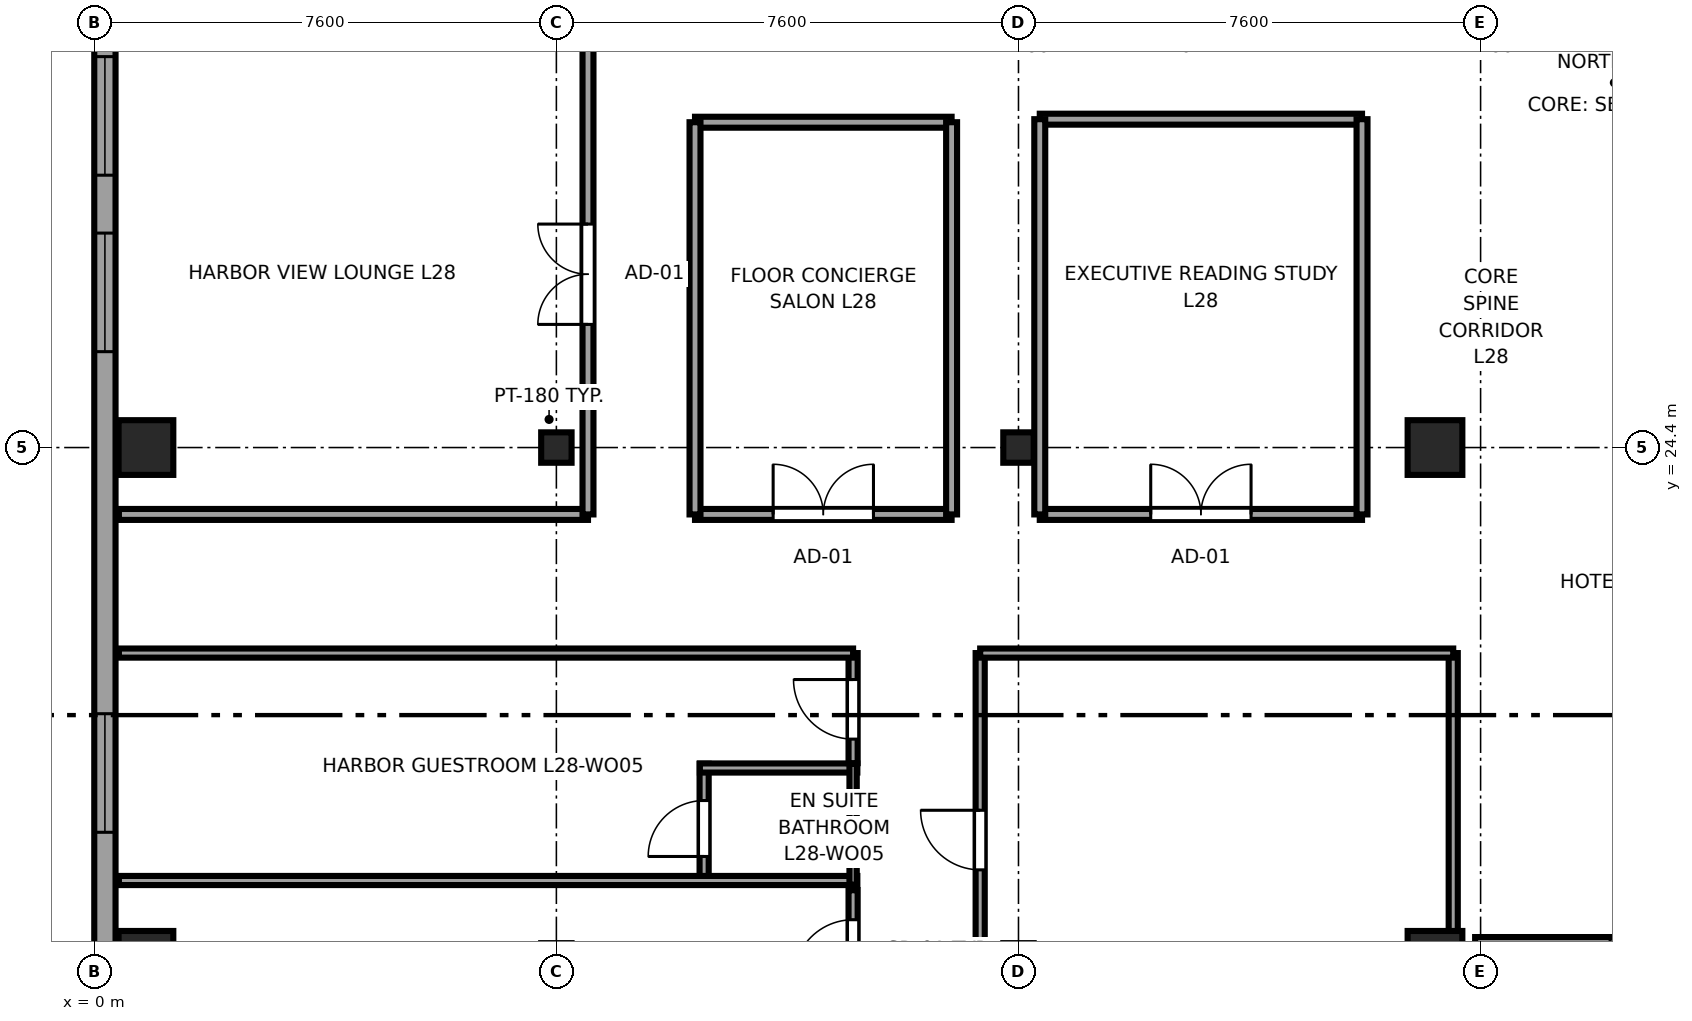
"""IFC4 building model, lengths in metres.
Left out: names, types, materials, properties, quantities, classifications, styles, units other than length and angle.
Written with IfcOpenShell. Run it as: python <this file> out.ifc"""

import sys

from ifc_helpers import new_model, si_unit, direction, frame, frame_2d, origin, origin_2d, place, context, subcontext, project, spatial, rectangle, i_section, extrude, source, transform, mapped, element, fill, save


model = new_model("IFC4")
c1 = context("Model", 3, precision=1e-05, world=origin(), true_north=direction((0.0, 1.0)))
c2 = subcontext(c1, "Body", "Model", "MODEL_VIEW")
j1 = project(units=[si_unit("LENGTHUNIT", "METRE"), si_unit("PLANEANGLEUNIT", "RADIAN")], contexts=[c1])
p1 = place(None, origin())
s1 = spatial("IfcSite", under=j1, at=p1, CompositionType="ELEMENT")
p2 = place(p1, origin())
s2 = spatial("IfcBuilding", under=s1, at=p2, CompositionType="ELEMENT")
p3 = place(p2, frame((0.0, 0.0, 111.55)))
s3 = spatial("IfcBuildingStorey", under=s2, at=p3, CompositionType="ELEMENT", Elevation=111.55)
m1 = source(origin(), c2, "Body", "SweptSolid", [
    extrude(rectangle(XDim=0.9, YDim=0.9, at=origin_2d()), origin(), (0.0, 0.0, 1.0), 3.55),
])
for number, where, z_axis, x_axis in (
    (1, (0.85, 16.0, 0.0), (0.0, 0.0, 1.0), (1.0, 0.0, 0.0)),
    (2, (0.85, 24.4, 0.0), (0.0, 0.0, 1.0), (1.0, 0.0, 0.0)),
):
    element("IfcColumn", number, at=place(p3, frame(where, z_axis=z_axis, x_axis=x_axis)), inside=s3, PredefinedType="COLUMN", context=c2, shape_type="MappedRepresentation", body=[
        mapped(m1, transform((0.0, 0.0, 0.0), x_axis=(1.0, 0.0, 0.0), y_axis=(0.0, 1.0, 0.0), z_axis=(0.0, 0.0, 1.0), scale=1.0)),
    ])
m2 = source(origin(), c2, "Body", "SweptSolid", [
    extrude(i_section(OverallWidth=0.5, OverallDepth=0.5, WebThickness=0.022, FlangeThickness=0.034, at=origin_2d()), origin(), (0.0, 0.0, 1.0), 3.55),
])
for number, where, z_axis, x_axis in (
    (3, (7.6, 24.4, 0.0), (0.0, 0.0, 1.0), (1.0, 0.0, 0.0)),
    (4, (15.2, 24.4, 0.0), (0.0, 0.0, 1.0), (1.0, 0.0, 0.0)),
):
    element("IfcColumn", number, at=place(p3, frame(where, z_axis=z_axis, x_axis=x_axis)), inside=s3, PredefinedType="COLUMN", context=c2, shape_type="MappedRepresentation", body=[
        mapped(m2, transform((0.0, 0.0, 0.0), x_axis=(1.0, 0.0, 0.0), y_axis=(0.0, 1.0, 0.0), z_axis=(0.0, 0.0, 1.0), scale=1.0)),
    ])
for number, where, z_axis, x_axis in (
    (5, (22.05, 16.0, 0.0), (0.0, 0.0, 1.0), (1.0, 0.0, 0.0)),
    (6, (22.05, 24.4, 0.0), (0.0, 0.0, 1.0), (1.0, 0.0, 0.0)),
):
    element("IfcColumn", number, at=place(p3, frame(where, z_axis=z_axis, x_axis=x_axis)), inside=s3, PredefinedType="COLUMN", context=c2, shape_type="MappedRepresentation", body=[
        mapped(m1, transform((0.0, 0.0, 0.0), x_axis=(1.0, 0.0, 0.0), y_axis=(0.0, 1.0, 0.0), z_axis=(0.0, 0.0, 1.0), scale=1.0)),
    ])
p4 = place(p3, frame((22.71, 16.175, 0.0), z_axis=(0.0, 0.0, 1.0), x_axis=(1.0, 0.0, 0.0)))
e7 = element("IfcWall", 7, at=p4, inside=s3, PredefinedType="SOLIDWALL", context=c2, shape_type="SweptSolid", body=[
    extrude(rectangle(XDim=11.58, YDim=0.35, at=frame_2d((5.79, 0.0))), origin(), (0.0, 0.0, 1.0), 2.748),
])
p5 = place(p4, frame((2.22, 0.0, 0.68)))
e8 = element("IfcOpeningElement", 8, at=p5, cuts=e7, PredefinedType="OPENING", context=c2, shape_type="SweptSolid", body=[
    extrude(rectangle(XDim=1.95, YDim=1.82, at=frame_2d((0.975, 0.91))), frame((0.0, 0.185, 0.0), z_axis=(0.0, -1.0, 0.0), x_axis=(1.0, 0.0, 0.0)), (0.0, 0.0, 1.0), 0.37),
])
p6 = place(p4, frame((7.41, 0.0, 0.68)))
e9 = element("IfcOpeningElement", 9, at=p6, cuts=e7, PredefinedType="OPENING", context=c2, shape_type="SweptSolid", body=[
    extrude(rectangle(XDim=1.95, YDim=1.82, at=frame_2d((0.975, 0.91))), frame((0.0, 0.185, 0.0), z_axis=(0.0, -1.0, 0.0), x_axis=(1.0, 0.0, 0.0)), (0.0, 0.0, 1.0), 0.37),
])
p7 = place(p3, frame((0.175, 41.383, 0.0), z_axis=(0.0, 0.0, 1.0), x_axis=(0.0, -1.0, 0.0)))
e10 = element("IfcWall", 10, at=p7, inside=s3, PredefinedType="SOLIDWALL", context=c2, shape_type="SweptSolid", body=[
    extrude(rectangle(XDim=36.766, YDim=0.35, at=frame_2d((18.383, 0.0))), origin(), (0.0, 0.0, 1.0), 3.37),
])
p8 = place(p7, frame((0.551, 0.0, 0.68)))
e11 = element("IfcOpeningElement", 11, at=p8, cuts=e10, PredefinedType="OPENING", context=c2, shape_type="SweptSolid", body=[
    extrude(rectangle(XDim=1.95, YDim=1.82, at=frame_2d((0.975, 0.91))), frame((0.0, 0.185, 0.0), z_axis=(0.0, -1.0, 0.0), x_axis=(1.0, 0.0, 0.0)), (0.0, 0.0, 1.0), 0.37),
])
p9 = place(p7, frame((4.503, 0.0, 0.68)))
e12 = element("IfcOpeningElement", 12, at=p9, cuts=e10, PredefinedType="OPENING", context=c2, shape_type="SweptSolid", body=[
    extrude(rectangle(XDim=1.95, YDim=1.82, at=frame_2d((0.975, 0.91))), frame((0.0, 0.185, 0.0), z_axis=(0.0, -1.0, 0.0), x_axis=(1.0, 0.0, 0.0)), (0.0, 0.0, 1.0), 0.37),
])
p10 = place(p7, frame((10.554, 0.0, 0.68)))
e13 = element("IfcOpeningElement", 13, at=p10, cuts=e10, PredefinedType="OPENING", context=c2, shape_type="SweptSolid", body=[
    extrude(rectangle(XDim=1.95, YDim=1.82, at=frame_2d((0.975, 0.91))), frame((0.0, 0.185, 0.0), z_axis=(0.0, -1.0, 0.0), x_axis=(1.0, 0.0, 0.0)), (0.0, 0.0, 1.0), 0.37),
])
p11 = place(p7, frame((13.456, 0.0, 0.68)))
e14 = element("IfcOpeningElement", 14, at=p11, cuts=e10, PredefinedType="OPENING", context=c2, shape_type="SweptSolid", body=[
    extrude(rectangle(XDim=1.95, YDim=1.82, at=frame_2d((0.975, 0.91))), frame((0.0, 0.185, 0.0), z_axis=(0.0, -1.0, 0.0), x_axis=(1.0, 0.0, 0.0)), (0.0, 0.0, 1.0), 0.37),
])
p12 = place(p7, frame((21.36, 0.0, 0.68)))
e15 = element("IfcOpeningElement", 15, at=p12, cuts=e10, PredefinedType="OPENING", context=c2, shape_type="SweptSolid", body=[
    extrude(rectangle(XDim=1.95, YDim=1.82, at=frame_2d((0.975, 0.91))), frame((0.0, 0.185, 0.0), z_axis=(0.0, -1.0, 0.0), x_axis=(1.0, 0.0, 0.0)), (0.0, 0.0, 1.0), 0.37),
])
p13 = place(p7, frame((29.263, 0.0, 0.68)))
e16 = element("IfcOpeningElement", 16, at=p13, cuts=e10, PredefinedType="OPENING", context=c2, shape_type="SweptSolid", body=[
    extrude(rectangle(XDim=1.95, YDim=1.82, at=frame_2d((0.975, 0.91))), frame((0.0, 0.185, 0.0), z_axis=(0.0, -1.0, 0.0), x_axis=(1.0, 0.0, 0.0)), (0.0, 0.0, 1.0), 0.37),
])
p14 = place(p7, frame((34.265, 0.0, 0.68)))
e17 = element("IfcOpeningElement", 17, at=p14, cuts=e10, PredefinedType="OPENING", context=c2, shape_type="SweptSolid", body=[
    extrude(rectangle(XDim=1.95, YDim=1.82, at=frame_2d((0.975, 0.91))), frame((0.0, 0.185, 0.0), z_axis=(0.0, -1.0, 0.0), x_axis=(1.0, 0.0, 0.0)), (0.0, 0.0, 1.0), 0.37),
])
p15 = place(p7, frame((25.433, 0.0, 0.62)))
e18 = element("IfcOpeningElement", 18, at=p15, cuts=e10, PredefinedType="OPENING", context=c2, shape_type="SweptSolid", body=[
    extrude(rectangle(XDim=1.5, YDim=1.55, at=frame_2d((0.75, 0.775))), frame((0.0, 0.185, 0.0), z_axis=(0.0, -1.0, 0.0), x_axis=(1.0, 0.0, 0.0)), (0.0, 0.0, 1.0), 0.37),
])
p16 = place(p3, frame((10.03, 17.21, 0.0), z_axis=(0.0, 0.0, 1.0), x_axis=(0.0, 1.0, 0.0)))
e19 = element("IfcWall", 19, at=p16, inside=s3, PredefinedType="PARTITIONING", context=c2, shape_type="SweptSolid", body=[
    extrude(rectangle(XDim=1.99, YDim=0.15, at=frame_2d((0.995, 0.0))), origin(), (0.0, 0.0, 1.0), 3.37),
])
p17 = place(p16, frame((0.465, 0.0, 0.0)))
e20 = element("IfcOpeningElement", 20, at=p17, cuts=e19, PredefinedType="OPENING", context=c2, shape_type="SweptSolid", body=[
    extrude(rectangle(XDim=0.92, YDim=2.01, at=frame_2d((0.46, 1.005))), frame((0.0, 0.085, 0.0), z_axis=(0.0, -1.0, 0.0), x_axis=(1.0, 0.0, 0.0)), (0.0, 0.0, 1.0), 0.17),
])
p18 = place(p3, frame((0.405, 17.28, 0.0), z_axis=(0.0, 0.0, 1.0), x_axis=(1.0, 0.0, 0.0)))
e21 = element("IfcWall", 21, at=p18, inside=s3, PredefinedType="PARTITIONING", context=c2, shape_type="SweptSolid", body=[
    extrude(rectangle(XDim=12.145, YDim=0.15, at=frame_2d((6.073, 0.0))), origin(), (0.0, 0.0, 1.0), 3.37),
])
p19 = place(p3, frame((9.96, 19.13, 0.0), z_axis=(0.0, 0.0, 1.0), x_axis=(1.0, 0.0, 0.0)))
e22 = element("IfcWall", 22, at=p19, inside=s3, PredefinedType="PARTITIONING", context=c2, shape_type="SweptSolid", body=[
    extrude(rectangle(XDim=2.59, YDim=0.15, at=frame_2d((1.295, 0.0))), origin(), (0.0, 0.0, 1.0), 3.37),
])
p20 = place(p3, frame((12.48, 17.21, 0.0), z_axis=(0.0, 0.0, 1.0), x_axis=(0.0, 1.0, 0.0)))
e23 = element("IfcWall", 23, at=p20, inside=s3, PredefinedType="PLUMBINGWALL", context=c2, shape_type="SweptSolid", body=[
    extrude(rectangle(XDim=1.99, YDim=0.12, at=frame_2d((0.995, 0.0))), origin(), (0.0, 0.0, 1.0), 3.37),
])
p21 = place(p3, frame((12.48, 15.21, 0.0), z_axis=(0.0, 0.0, 1.0), x_axis=(0.0, 1.0, 0.0)))
e24 = element("IfcWall", 24, at=p21, inside=s3, PredefinedType="PARTITIONING", context=c2, shape_type="SweptSolid", body=[
    extrude(rectangle(XDim=1.91, YDim=0.15, at=frame_2d((0.955, 0.0))), origin(), (0.0, 0.0, 1.0), 3.37),
])
p22 = place(p21, frame((0.445, 0.0, 0.0)))
e25 = element("IfcOpeningElement", 25, at=p22, cuts=e24, PredefinedType="OPENING", context=c2, shape_type="SweptSolid", body=[
    extrude(rectangle(XDim=0.98, YDim=2.12, at=frame_2d((0.49, 1.06))), frame((0.0, 0.085, 0.0), z_axis=(0.0, -1.0, 0.0), x_axis=(1.0, 0.0, 0.0)), (0.0, 0.0, 1.0), 0.17),
])
p23 = place(p3, frame((12.48, 19.21, 0.0), z_axis=(0.0, 0.0, 1.0), x_axis=(0.0, 1.0, 0.0)))
e26 = element("IfcWall", 26, at=p23, inside=s3, PredefinedType="PARTITIONING", context=c2, shape_type="SweptSolid", body=[
    extrude(rectangle(XDim=1.81, YDim=0.15, at=frame_2d((0.905, 0.0))), origin(), (0.0, 0.0, 1.0), 3.37),
])
p24 = place(p23, frame((0.395, 0.0, 0.0)))
e27 = element("IfcOpeningElement", 27, at=p24, cuts=e26, PredefinedType="OPENING", context=c2, shape_type="SweptSolid", body=[
    extrude(rectangle(XDim=0.98, YDim=2.12, at=frame_2d((0.49, 1.06))), frame((0.0, 0.085, 0.0), z_axis=(0.0, -1.0, 0.0), x_axis=(1.0, 0.0, 0.0)), (0.0, 0.0, 1.0), 0.17),
])
p25 = place(p3, frame((0.405, 21.02, 0.0), z_axis=(0.0, 0.0, 1.0), x_axis=(1.0, 0.0, 0.0)))
e28 = element("IfcWall", 28, at=p25, inside=s3, PredefinedType="PARTITIONING", context=c2, shape_type="SweptSolid", body=[
    extrude(rectangle(XDim=12.075, YDim=0.15, at=frame_2d((6.038, 0.0))), origin(), (0.0, 0.0, 1.0), 3.37),
])
p26 = place(p3, frame((14.57, 13.01, 0.0), z_axis=(0.0, 0.0, 1.0), x_axis=(0.0, 1.0, 0.0)))
e29 = element("IfcWall", 29, at=p26, inside=s3, PredefinedType="PARTITIONING", context=c2, shape_type="SweptSolid", body=[
    extrude(rectangle(XDim=8.01, YDim=0.15, at=frame_2d((4.005, 0.0))), origin(), (0.0, 0.0, 1.0), 3.37),
])
p27 = place(p26, frame((4.445, 0.0, 0.0)))
e30 = element("IfcOpeningElement", 30, at=p27, cuts=e29, PredefinedType="OPENING", context=c2, shape_type="SweptSolid", body=[
    extrude(rectangle(XDim=0.98, YDim=2.12, at=frame_2d((0.49, 1.06))), frame((0.0, 0.085, 0.0), z_axis=(0.0, -1.0, 0.0), x_axis=(1.0, 0.0, 0.0)), (0.0, 0.0, 1.0), 0.17),
])
p28 = place(p3, frame((22.35, 10.68, 0.0), z_axis=(0.0, 0.0, 1.0), x_axis=(0.0, 1.0, 0.0)))
e31 = element("IfcWall", 31, at=p28, inside=s3, PredefinedType="PARTITIONING", context=c2, shape_type="SweptSolid", body=[
    extrude(rectangle(XDim=10.34, YDim=0.15, at=frame_2d((5.17, 0.0))), origin(), (0.0, 0.0, 1.0), 3.37),
])
p29 = place(p3, frame((14.57, 21.02, 0.0), z_axis=(0.0, 0.0, 1.0), x_axis=(1.0, 0.0, 0.0)))
e32 = element("IfcWall", 32, at=p29, inside=s3, PredefinedType="PARTITIONING", context=c2, shape_type="SweptSolid", body=[
    extrude(rectangle(XDim=7.78, YDim=0.15, at=frame_2d((3.89, 0.0))), origin(), (0.0, 0.0, 1.0), 3.37),
])
p30 = place(p3, frame((0.405, 23.3, 0.0), z_axis=(0.0, 0.0, 1.0), x_axis=(1.0, 0.0, 0.0)))
e33 = element("IfcWall", 33, at=p30, inside=s3, PredefinedType="PARTITIONING", context=c2, shape_type="SweptSolid", body=[
    extrude(rectangle(XDim=7.715, YDim=0.18, at=frame_2d((3.857, 0.0))), origin(), (0.0, 0.0, 1.0), 3.37),
])
p31 = place(p3, frame((8.12, 23.3, 0.0), z_axis=(0.0, 0.0, 1.0), x_axis=(0.0, 1.0, 0.0)))
e34 = element("IfcWall", 34, at=p31, inside=s3, PredefinedType="PARTITIONING", context=c2, shape_type="SweptSolid", body=[
    extrude(rectangle(XDim=7.9, YDim=0.18, at=frame_2d((3.95, 0.0))), origin(), (0.0, 0.0, 1.0), 3.37),
])
p32 = place(p31, frame((3.125, 0.0, 0.0)))
e35 = element("IfcOpeningElement", 35, at=p32, cuts=e34, PredefinedType="OPENING", context=c2, shape_type="SweptSolid", body=[
    extrude(rectangle(XDim=1.65, YDim=2.15, at=frame_2d((0.825, 1.075))), frame((0.0, 0.1, 0.0), z_axis=(0.0, -1.0, 0.0), x_axis=(1.0, 0.0, 0.0)), (0.0, 0.0, 1.0), 0.2),
])
p33 = place(p3, frame((9.88, 23.3, 0.0), z_axis=(0.0, 0.0, 1.0), x_axis=(1.0, 0.0, 0.0)))
e36 = element("IfcWall", 36, at=p33, inside=s3, PredefinedType="PARTITIONING", context=c2, shape_type="SweptSolid", body=[
    extrude(rectangle(XDim=4.22, YDim=0.18, at=frame_2d((2.11, 0.0))), origin(), (0.0, 0.0, 1.0), 3.37),
])
p34 = place(p33, frame((1.285, 0.0, 0.0)))
e37 = element("IfcOpeningElement", 37, at=p34, cuts=e36, PredefinedType="OPENING", context=c2, shape_type="SweptSolid", body=[
    extrude(rectangle(XDim=1.65, YDim=2.15, at=frame_2d((0.825, 1.075))), frame((0.0, 0.1, 0.0), z_axis=(0.0, -1.0, 0.0), x_axis=(1.0, 0.0, 0.0)), (0.0, 0.0, 1.0), 0.2),
])
p35 = place(p3, frame((9.88, 29.75, 0.0), z_axis=(0.0, 0.0, 1.0), x_axis=(1.0, 0.0, 0.0)))
e38 = element("IfcWall", 38, at=p35, inside=s3, PredefinedType="PARTITIONING", context=c2, shape_type="SweptSolid", body=[
    extrude(rectangle(XDim=4.22, YDim=0.18, at=frame_2d((2.11, 0.0))), origin(), (0.0, 0.0, 1.0), 3.37),
])
for number, where, z_axis, x_axis in (
    (39, (9.88, 23.3, 0.0), (0.0, 0.0, 1.0), (0.0, 1.0, 0.0)),
    (40, (14.1, 23.3, 0.0), (0.0, 0.0, 1.0), (0.0, 1.0, 0.0)),
):
    element("IfcWall", number, at=place(p3, frame(where, z_axis=z_axis, x_axis=x_axis)), inside=s3, PredefinedType="PARTITIONING", context=c2, shape_type="SweptSolid", body=[
        extrude(rectangle(XDim=6.45, YDim=0.18, at=frame_2d((3.225, 0.0))), origin(), (0.0, 0.0, 1.0), 3.37),
    ])
p36 = place(p3, frame((15.55, 23.3, 0.0), z_axis=(0.0, 0.0, 1.0), x_axis=(1.0, 0.0, 0.0)))
e41 = element("IfcWall", 41, at=p36, inside=s3, PredefinedType="PARTITIONING", context=c2, shape_type="SweptSolid", body=[
    extrude(rectangle(XDim=5.3, YDim=0.18, at=frame_2d((2.65, 0.0))), origin(), (0.0, 0.0, 1.0), 3.37),
])
p37 = place(p36, frame((1.825, 0.0, 0.0)))
e42 = element("IfcOpeningElement", 42, at=p37, cuts=e41, PredefinedType="OPENING", context=c2, shape_type="SweptSolid", body=[
    extrude(rectangle(XDim=1.65, YDim=2.15, at=frame_2d((0.825, 1.075))), frame((0.0, 0.1, 0.0), z_axis=(0.0, -1.0, 0.0), x_axis=(1.0, 0.0, 0.0)), (0.0, 0.0, 1.0), 0.2),
])
p38 = place(p3, frame((15.55, 29.8, 0.0), z_axis=(0.0, 0.0, 1.0), x_axis=(1.0, 0.0, 0.0)))
e43 = element("IfcWall", 43, at=p38, inside=s3, PredefinedType="PARTITIONING", context=c2, shape_type="SweptSolid", body=[
    extrude(rectangle(XDim=5.3, YDim=0.18, at=frame_2d((2.65, 0.0))), origin(), (0.0, 0.0, 1.0), 3.37),
])
for number, where, z_axis, x_axis in (
    (44, (15.55, 23.3, 0.0), (0.0, 0.0, 1.0), (0.0, 1.0, 0.0)),
    (45, (20.85, 23.3, 0.0), (0.0, 0.0, 1.0), (0.0, 1.0, 0.0)),
):
    element("IfcWall", number, at=place(p3, frame(where, z_axis=z_axis, x_axis=x_axis)), inside=s3, PredefinedType="PARTITIONING", context=c2, shape_type="SweptSolid", body=[
        extrude(rectangle(XDim=6.5, YDim=0.18, at=frame_2d((3.25, 0.0))), origin(), (0.0, 0.0, 1.0), 3.37),
    ])
m3 = source(origin(), c2, "Body", "SweptSolid", [
    extrude(rectangle(XDim=1.95, YDim=1.82, at=frame_2d((0.975, 0.91))), frame((0.0, 0.09, 0.0), z_axis=(0.0, -1.0, 0.0), x_axis=(1.0, 0.0, 0.0)), (0.0, 0.0, 1.0), 0.06),
])
p39 = place(p10, origin())
e46 = element("IfcWindow", 46, at=p39, inside=s3, PartitioningType="DOUBLE_PANEL_VERTICAL", PredefinedType="WINDOW", context=c2, shape_type="MappedRepresentation", body=[
    mapped(m3, transform((0.0, 0.0, 0.0), x_axis=(1.0, 0.0, 0.0), y_axis=(0.0, 1.0, 0.0), z_axis=(0.0, 0.0, 1.0), scale=1.0)),
])
fill(e13, e46)
p40 = place(p11, origin())
e47 = element("IfcWindow", 47, at=p40, inside=s3, PartitioningType="DOUBLE_PANEL_VERTICAL", PredefinedType="WINDOW", context=c2, shape_type="MappedRepresentation", body=[
    mapped(m3, transform((0.0, 0.0, 0.0), x_axis=(1.0, 0.0, 0.0), y_axis=(0.0, 1.0, 0.0), z_axis=(0.0, 0.0, 1.0), scale=1.0)),
])
fill(e14, e47)
p41 = place(p12, origin())
e48 = element("IfcWindow", 48, at=p41, inside=s3, PartitioningType="DOUBLE_PANEL_VERTICAL", PredefinedType="WINDOW", context=c2, shape_type="MappedRepresentation", body=[
    mapped(m3, transform((0.0, 0.0, 0.0), x_axis=(1.0, 0.0, 0.0), y_axis=(0.0, 1.0, 0.0), z_axis=(0.0, 0.0, 1.0), scale=1.0)),
])
fill(e15, e48)
m4 = source(origin(), c2, "Body", "SweptSolid", [
    extrude(rectangle(XDim=0.92, YDim=2.01, at=frame_2d((0.46, 1.005))), frame((0.0, 0.025, 0.0), z_axis=(0.0, -1.0, 0.0), x_axis=(1.0, 0.0, 0.0)), (0.0, 0.0, 1.0), 0.05),
])
p42 = place(p17, origin())
e49 = element("IfcDoor", 49, at=p42, inside=s3, OperationType="SINGLE_SWING_LEFT", PredefinedType="DOOR", context=c2, shape_type="MappedRepresentation", body=[
    mapped(m4, transform((0.0, 0.0, 0.0), x_axis=(1.0, 0.0, 0.0), y_axis=(0.0, 1.0, 0.0), z_axis=(0.0, 0.0, 1.0), scale=1.0)),
])
fill(e20, e49)
m5 = source(origin(), c2, "Body", "SweptSolid", [
    extrude(rectangle(XDim=0.98, YDim=2.12, at=frame_2d((0.49, 1.06))), frame((0.0, 0.025, 0.0), z_axis=(0.0, -1.0, 0.0), x_axis=(1.0, 0.0, 0.0)), (0.0, 0.0, 1.0), 0.05),
])
p43 = place(p22, origin())
e50 = element("IfcDoor", 50, at=p43, inside=s3, OperationType="SINGLE_SWING_LEFT", PredefinedType="DOOR", context=c2, shape_type="MappedRepresentation", body=[
    mapped(m5, transform((0.0, 0.0, 0.0), x_axis=(1.0, 0.0, 0.0), y_axis=(0.0, 1.0, 0.0), z_axis=(0.0, 0.0, 1.0), scale=1.0)),
])
fill(e25, e50)
p44 = place(p24, origin())
e51 = element("IfcDoor", 51, at=p44, inside=s3, OperationType="SINGLE_SWING_RIGHT", PredefinedType="DOOR", context=c2, shape_type="MappedRepresentation", body=[
    mapped(m5, transform((0.0, 0.0, 0.0), x_axis=(1.0, 0.0, 0.0), y_axis=(0.0, 1.0, 0.0), z_axis=(0.0, 0.0, 1.0), scale=1.0)),
])
fill(e27, e51)
p45 = place(p27, origin())
e52 = element("IfcDoor", 52, at=p45, inside=s3, OperationType="SINGLE_SWING_RIGHT", PredefinedType="DOOR", context=c2, shape_type="MappedRepresentation", body=[
    mapped(m5, transform((0.0, 0.0, 0.0), x_axis=(1.0, 0.0, 0.0), y_axis=(0.0, 1.0, 0.0), z_axis=(0.0, 0.0, 1.0), scale=1.0)),
])
fill(e30, e52)
m6 = source(origin(), c2, "Body", "SweptSolid", [
    extrude(rectangle(XDim=1.65, YDim=2.15, at=frame_2d((0.825, 1.075))), frame((0.0, 0.025, 0.0), z_axis=(0.0, -1.0, 0.0), x_axis=(1.0, 0.0, 0.0)), (0.0, 0.0, 1.0), 0.05),
])
p46 = place(p32, origin())
e53 = element("IfcDoor", 53, at=p46, inside=s3, OperationType="DOUBLE_DOOR_SINGLE_SWING", PredefinedType="DOOR", context=c2, shape_type="MappedRepresentation", body=[
    mapped(m6, transform((0.0, 0.0, 0.0), x_axis=(1.0, 0.0, 0.0), y_axis=(0.0, 1.0, 0.0), z_axis=(0.0, 0.0, 1.0), scale=1.0)),
])
fill(e35, e53)
p47 = place(p34, origin())
e54 = element("IfcDoor", 54, at=p47, inside=s3, OperationType="DOUBLE_DOOR_SINGLE_SWING", PredefinedType="DOOR", context=c2, shape_type="MappedRepresentation", body=[
    mapped(m6, transform((0.0, 0.0, 0.0), x_axis=(1.0, 0.0, 0.0), y_axis=(0.0, 1.0, 0.0), z_axis=(0.0, 0.0, 1.0), scale=1.0)),
])
fill(e37, e54)
p48 = place(p37, origin())
e55 = element("IfcDoor", 55, at=p48, inside=s3, OperationType="DOUBLE_DOOR_SINGLE_SWING", PredefinedType="DOOR", context=c2, shape_type="MappedRepresentation", body=[
    mapped(m6, transform((0.0, 0.0, 0.0), x_axis=(1.0, 0.0, 0.0), y_axis=(0.0, 1.0, 0.0), z_axis=(0.0, 0.0, 1.0), scale=1.0)),
])
fill(e42, e55)
save(model, sys.argv[1])
